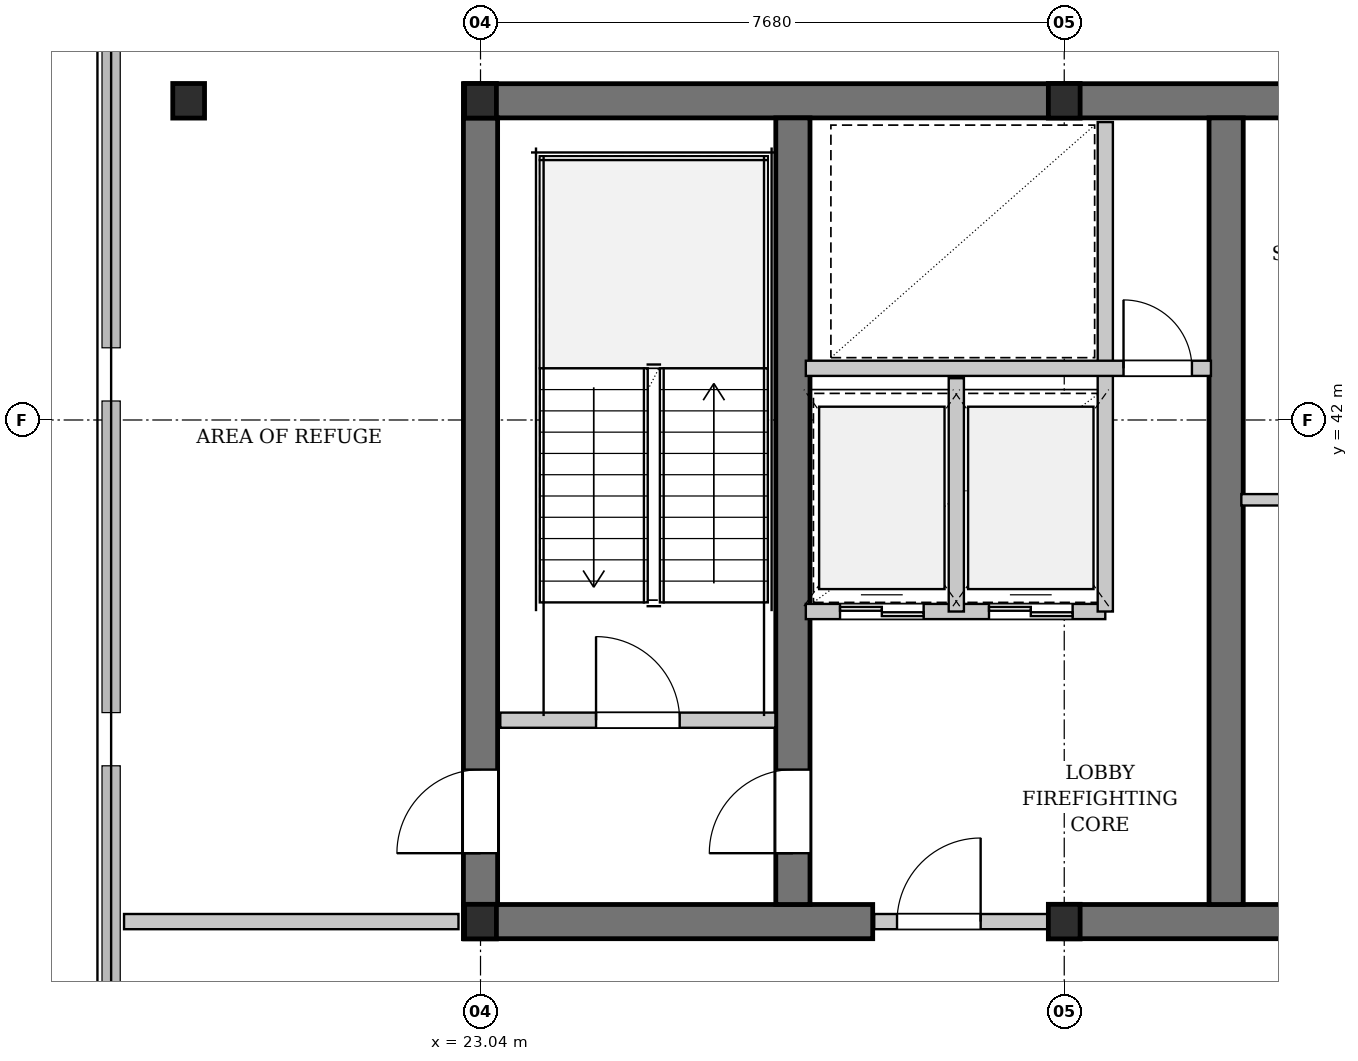
"""IFC4 building model, lengths in metres.
Left out: names, types, materials, properties, quantities, classifications, styles, units other than length and angle.
Written with IfcOpenShell. Run it as: python <this file> out.ifc"""

import sys

from ifc_helpers import new_model, si_unit, direction, frame, frame_2d, origin, origin_2d, place, context, subcontext, project, spatial, rectangle, i_section, extrude, element, fill, save


model = new_model("IFC4")
c1 = context("Model", 3, precision=1e-05, world=origin(), true_north=direction((0.0, 1.0)))
c2 = subcontext(c1, "Body", "Model", "MODEL_VIEW")
j1 = project(units=[si_unit("LENGTHUNIT", "METRE"), si_unit("PLANEANGLEUNIT", "RADIAN")], contexts=[c1])
p1 = place(None, origin())
s1 = spatial("IfcSite", under=j1, at=p1, CompositionType="ELEMENT")
p2 = place(p1, origin())
s2 = spatial("IfcBuilding", under=s1, at=p2, CompositionType="ELEMENT")
p3 = place(p2, frame((0.0, 0.0, 191.9)))
s3 = spatial("IfcBuildingStorey", under=s2, at=p3, CompositionType="ELEMENT", Elevation=191.9)
p4 = place(p3, frame((22.815, 46.2, 0.0), z_axis=(0.0, 0.0, 1.0), x_axis=(1.0, 0.0, 0.0)))
e1 = element("IfcWall", 1, at=p4, inside=s3, PredefinedType="SHEAR", context=c2, shape_type="SweptSolid", body=[
    extrude(rectangle(XDim=31.17, YDim=0.45, at=frame_2d((15.585, 0.0))), origin(), (0.0, 0.0, 1.0), 3.98),
])
p5 = place(p3, frame((22.815, 35.4, 0.0), z_axis=(0.0, 0.0, 1.0), x_axis=(1.0, 0.0, 0.0)))
e2 = element("IfcWall", 2, at=p5, inside=s3, PredefinedType="SHEAR", context=c2, shape_type="SweptSolid", body=[
    extrude(rectangle(XDim=5.385, YDim=0.45, at=frame_2d((2.692, 0.0))), origin(), (0.0, 0.0, 1.0), 3.98),
])
p6 = place(p3, frame((30.72, 35.4, 0.0), z_axis=(0.0, 0.0, 1.0), x_axis=(1.0, 0.0, 0.0)))
e3 = element("IfcWall", 3, at=p6, inside=s3, PredefinedType="SHEAR", context=c2, shape_type="SweptSolid", body=[
    extrude(rectangle(XDim=4.88, YDim=0.45, at=frame_2d((2.44, 0.0))), origin(), (0.0, 0.0, 1.0), 3.98),
])
p7 = place(p3, frame((23.04, 35.625, 0.0), z_axis=(0.0, 0.0, 1.0), x_axis=(0.0, 1.0, 0.0)))
e4 = element("IfcWall", 4, at=p7, inside=s3, PredefinedType="SHEAR", context=c2, shape_type="SweptSolid", body=[
    extrude(rectangle(XDim=10.35, YDim=0.45, at=frame_2d((5.175, 0.0))), origin(), (0.0, 0.0, 1.0), 3.98),
])
p8 = place(p7, frame((0.675, 0.0, 0.0)))
e5 = element("IfcOpeningElement", 5, at=p8, cuts=e4, PredefinedType="OPENING", context=c2, shape_type="SweptSolid", body=[
    extrude(rectangle(XDim=1.1, YDim=2.15, at=frame_2d((0.55, 1.075))), frame((0.0, 0.235, 0.0), z_axis=(0.0, -1.0, 0.0), x_axis=(1.0, 0.0, 0.0)), (0.0, 0.0, 1.0), 0.47),
])
p9 = place(p3, frame((27.15, 35.625, 0.0), z_axis=(0.0, 0.0, 1.0), x_axis=(0.0, 1.0, 0.0)))
e6 = element("IfcWall", 6, at=p9, inside=s3, PredefinedType="SHEAR", context=c2, shape_type="SweptSolid", body=[
    extrude(rectangle(XDim=10.35, YDim=0.45, at=frame_2d((5.175, 0.0))), origin(), (0.0, 0.0, 1.0), 3.98),
])
p10 = place(p9, frame((0.675, 0.0, 0.0)))
e7 = element("IfcOpeningElement", 7, at=p10, cuts=e6, PredefinedType="OPENING", context=c2, shape_type="SweptSolid", body=[
    extrude(rectangle(XDim=1.1, YDim=2.15, at=frame_2d((0.55, 1.075))), frame((0.0, 0.235, 0.0), z_axis=(0.0, -1.0, 0.0), x_axis=(1.0, 0.0, 0.0)), (0.0, 0.0, 1.0), 0.47),
])
p11 = place(p3, frame((32.85, 35.625, 0.0), z_axis=(0.0, 0.0, 1.0), x_axis=(0.0, 1.0, 0.0)))
e8 = element("IfcWall", 8, at=p11, inside=s3, PredefinedType="SHEAR", context=c2, shape_type="SweptSolid", body=[
    extrude(rectangle(XDim=10.35, YDim=0.45, at=frame_2d((5.175, 0.0))), origin(), (0.0, 0.0, 1.0), 3.98),
])
for number, where, z_axis, x_axis in (
    (9, (23.04, 35.4, 0.0), (0.0, 0.0, 1.0), (1.0, 0.0, 0.0)),
    (10, (23.04, 46.2, 0.0), (0.0, 0.0, 1.0), (1.0, 0.0, 0.0)),
    (11, (30.72, 35.4, 0.0), (0.0, 0.0, 1.0), (1.0, 0.0, 0.0)),
    (12, (30.72, 46.2, 0.0), (0.0, 0.0, 1.0), (1.0, 0.0, 0.0)),
    (13, (19.2, 46.2, 0.0), (0.0, 0.0, 1.0), (1.0, 0.0, 0.0)),
):
    element("IfcColumn", number, at=place(p3, frame(where, z_axis=z_axis, x_axis=x_axis)), inside=s3, PredefinedType="COLUMN", context=c2, shape_type="SweptSolid", body=[
        extrude(i_section(OverallWidth=0.418, OverallDepth=0.455, WebThickness=0.042, FlangeThickness=0.068, FilletRadius=0.015, at=origin_2d()), origin(), (0.0, 0.0, 1.0), 4.2),
    ])
p12 = place(p3, frame((23.3, 38.05, 0.0), z_axis=(0.0, 0.0, 1.0), x_axis=(1.0, 0.0, 0.0)))
e14 = element("IfcWall", 14, at=p12, inside=s3, PredefinedType="PARTITIONING", context=c2, shape_type="SweptSolid", body=[
    extrude(rectangle(XDim=3.62, YDim=0.2, at=frame_2d((1.81, 0.0))), origin(), (0.0, 0.0, 1.0), 3.98),
])
p13 = place(p12, frame((1.26, 0.0, 0.0)))
e15 = element("IfcOpeningElement", 15, at=p13, cuts=e14, PredefinedType="OPENING", context=c2, shape_type="SweptSolid", body=[
    extrude(rectangle(XDim=1.1, YDim=2.15, at=frame_2d((0.55, 1.075))), frame((0.0, 0.11, 0.0), z_axis=(0.0, -1.0, 0.0), x_axis=(1.0, 0.0, 0.0)), (0.0, 0.0, 1.0), 0.22),
])
p14 = place(p3, frame((28.22, 35.4, 0.0), z_axis=(0.0, 0.0, 1.0), x_axis=(1.0, 0.0, 0.0)))
e16 = element("IfcWall", 16, at=p14, inside=s3, PredefinedType="PARTITIONING", context=c2, shape_type="SweptSolid", body=[
    extrude(rectangle(XDim=2.5, YDim=0.2, at=frame_2d((1.25, 0.0))), origin(), (0.0, 0.0, 1.0), 3.161),
])
p15 = place(p14, frame((0.3, 0.0, 0.0)))
e17 = element("IfcOpeningElement", 17, at=p15, cuts=e16, PredefinedType="OPENING", context=c2, shape_type="SweptSolid", body=[
    extrude(rectangle(XDim=1.1, YDim=2.15, at=frame_2d((0.55, 1.075))), frame((0.0, 0.11, 0.0), z_axis=(0.0, -1.0, 0.0), x_axis=(1.0, 0.0, 0.0)), (0.0, 0.0, 1.0), 0.22),
])
p16 = place(p3, frame((27.32, 39.48, 0.0), z_axis=(0.0, 0.0, 1.0), x_axis=(1.0, 0.0, 0.0)))
e18 = element("IfcWall", 18, at=p16, inside=s3, PredefinedType="PARTITIONING", context=c2, shape_type="SweptSolid", body=[
    extrude(rectangle(XDim=3.94, YDim=0.2, at=frame_2d((1.97, 0.0))), origin(), (0.0, 0.0, 1.0), 3.98),
])
p17 = place(p16, frame((0.45, 0.0, 0.0)))
e19 = element("IfcOpeningElement", 19, at=p17, cuts=e18, PredefinedType="OPENING", context=c2, shape_type="SweptSolid", body=[
    extrude(rectangle(XDim=1.1, YDim=2.2, at=frame_2d((0.55, 1.1))), frame((0.0, 0.11, 0.0), z_axis=(0.0, -1.0, 0.0), x_axis=(1.0, 0.0, 0.0)), (0.0, 0.0, 1.0), 0.22),
])
p18 = place(p16, frame((2.41, 0.0, 0.0)))
e20 = element("IfcOpeningElement", 20, at=p18, cuts=e18, PredefinedType="OPENING", context=c2, shape_type="SweptSolid", body=[
    extrude(rectangle(XDim=1.1, YDim=2.2, at=frame_2d((0.55, 1.1))), frame((0.0, 0.11, 0.0), z_axis=(0.0, -1.0, 0.0), x_axis=(1.0, 0.0, 0.0)), (0.0, 0.0, 1.0), 0.22),
])
p19 = place(p3, frame((29.3, 39.48, 0.0), z_axis=(0.0, 0.0, 1.0), x_axis=(0.0, 1.0, 0.0)))
e21 = element("IfcWall", 21, at=p19, inside=s3, PredefinedType="PARTITIONING", context=c2, shape_type="SweptSolid", body=[
    extrude(rectangle(XDim=3.07, YDim=0.2, at=frame_2d((1.535, 0.0))), origin(), (0.0, 0.0, 1.0), 3.98),
])
p20 = place(p3, frame((31.26, 39.48, 0.0), z_axis=(0.0, 0.0, 1.0), x_axis=(0.0, 1.0, 0.0)))
e22 = element("IfcWall", 22, at=p20, inside=s3, PredefinedType="PARTITIONING", context=c2, shape_type="SweptSolid", body=[
    extrude(rectangle(XDim=6.44, YDim=0.2, at=frame_2d((3.22, 0.0))), origin(), (0.0, 0.0, 1.0), 3.98),
])
p21 = place(p3, frame((27.32, 42.68, 0.0), z_axis=(0.0, 0.0, 1.0), x_axis=(1.0, 0.0, 0.0)))
e23 = element("IfcWall", 23, at=p21, inside=s3, PredefinedType="PARTITIONING", context=c2, shape_type="SweptSolid", body=[
    extrude(rectangle(XDim=5.33, YDim=0.2, at=frame_2d((2.665, 0.0))), origin(), (0.0, 0.0, 1.0), 3.98),
])
p22 = place(p21, frame((4.18, 0.0, 0.0)))
e24 = element("IfcOpeningElement", 24, at=p22, cuts=e23, PredefinedType="OPENING", context=c2, shape_type="SweptSolid", body=[
    extrude(rectangle(XDim=0.9, YDim=2.15, at=frame_2d((0.45, 1.075))), frame((0.0, 0.11, 0.0), z_axis=(0.0, -1.0, 0.0), x_axis=(1.0, 0.0, 0.0)), (0.0, 0.0, 1.0), 0.22),
])
p23 = place(p3, frame((33.05, 40.95, 0.0), z_axis=(0.0, 0.0, 1.0), x_axis=(1.0, 0.0, 0.0)))
e25 = element("IfcWall", 25, at=p23, inside=s3, PredefinedType="PARTITIONING", context=c2, shape_type="SweptSolid", body=[
    extrude(rectangle(XDim=3.57, YDim=0.15, at=frame_2d((1.785, 0.0))), origin(), (0.0, 0.0, 1.0), 3.98),
])
p24 = place(p3, frame((18.35, 35.4, 0.0), z_axis=(0.0, 0.0, 1.0), x_axis=(1.0, 0.0, 0.0)))
e26 = element("IfcWall", 26, at=p24, inside=s3, PredefinedType="PARTITIONING", context=c2, shape_type="SweptSolid", body=[
    extrude(rectangle(XDim=4.4, YDim=0.2, at=frame_2d((2.2, 0.0))), origin(), (0.0, 0.0, 1.0), 3.98),
])
p25 = place(p13, origin())
e27 = element("IfcDoor", 27, at=p25, inside=s3, OperationType="SINGLE_SWING_LEFT", PredefinedType="DOOR", context=c2, shape_type="SweptSolid", body=[
    extrude(rectangle(XDim=1.1, YDim=2.15, at=frame_2d((0.55, 1.075))), frame((0.0, 0.025, 0.0), z_axis=(0.0, -1.0, 0.0), x_axis=(1.0, 0.0, 0.0)), (0.0, 0.0, 1.0), 0.05),
])
fill(e15, e27)
p26 = place(p15, origin())
e28 = element("IfcDoor", 28, at=p26, inside=s3, OperationType="SINGLE_SWING_RIGHT", PredefinedType="DOOR", context=c2, shape_type="SweptSolid", body=[
    extrude(rectangle(XDim=1.1, YDim=2.15, at=frame_2d((0.55, 1.075))), frame((0.0, 0.025, 0.0), z_axis=(0.0, -1.0, 0.0), x_axis=(1.0, 0.0, 0.0)), (0.0, 0.0, 1.0), 0.05),
])
fill(e17, e28)
p27 = place(p17, origin())
e29 = element("IfcDoor", 29, at=p27, inside=s3, OperationType="DOUBLE_DOOR_SLIDING", PredefinedType="DOOR", context=c2, shape_type="SweptSolid", body=[
    extrude(rectangle(XDim=1.1, YDim=2.2, at=frame_2d((0.55, 1.1))), frame((0.0, 0.025, 0.0), z_axis=(0.0, -1.0, 0.0), x_axis=(1.0, 0.0, 0.0)), (0.0, 0.0, 1.0), 0.05),
])
fill(e19, e29)
p28 = place(p18, origin())
e30 = element("IfcDoor", 30, at=p28, inside=s3, OperationType="DOUBLE_DOOR_SLIDING", PredefinedType="DOOR", context=c2, shape_type="SweptSolid", body=[
    extrude(rectangle(XDim=1.1, YDim=2.2, at=frame_2d((0.55, 1.1))), frame((0.0, 0.025, 0.0), z_axis=(0.0, -1.0, 0.0), x_axis=(1.0, 0.0, 0.0)), (0.0, 0.0, 1.0), 0.05),
])
fill(e20, e30)
p29 = place(p22, origin())
e31 = element("IfcDoor", 31, at=p29, inside=s3, OperationType="SINGLE_SWING_LEFT", PredefinedType="DOOR", context=c2, shape_type="SweptSolid", body=[
    extrude(rectangle(XDim=0.9, YDim=2.15, at=frame_2d((0.45, 1.075))), frame((0.0, 0.025, 0.0), z_axis=(0.0, -1.0, 0.0), x_axis=(1.0, 0.0, 0.0)), (0.0, 0.0, 1.0), 0.05),
])
fill(e24, e31)
p30 = place(p10, origin())
e32 = element("IfcDoor", 32, at=p30, inside=s3, OperationType="SINGLE_SWING_LEFT", PredefinedType="DOOR", context=c2, shape_type="SweptSolid", body=[
    extrude(rectangle(XDim=1.1, YDim=2.15, at=frame_2d((0.55, 1.075))), frame((0.0, 0.025, 0.0), z_axis=(0.0, -1.0, 0.0), x_axis=(1.0, 0.0, 0.0)), (0.0, 0.0, 1.0), 0.05),
])
fill(e7, e32)
p31 = place(p8, origin())
e33 = element("IfcDoor", 33, at=p31, inside=s3, OperationType="SINGLE_SWING_LEFT", PredefinedType="DOOR", context=c2, shape_type="SweptSolid", body=[
    extrude(rectangle(XDim=1.1, YDim=2.15, at=frame_2d((0.55, 1.075))), frame((0.0, 0.025, 0.0), z_axis=(0.0, -1.0, 0.0), x_axis=(1.0, 0.0, 0.0)), (0.0, 0.0, 1.0), 0.05),
])
fill(e5, e33)
save(model, sys.argv[1])
